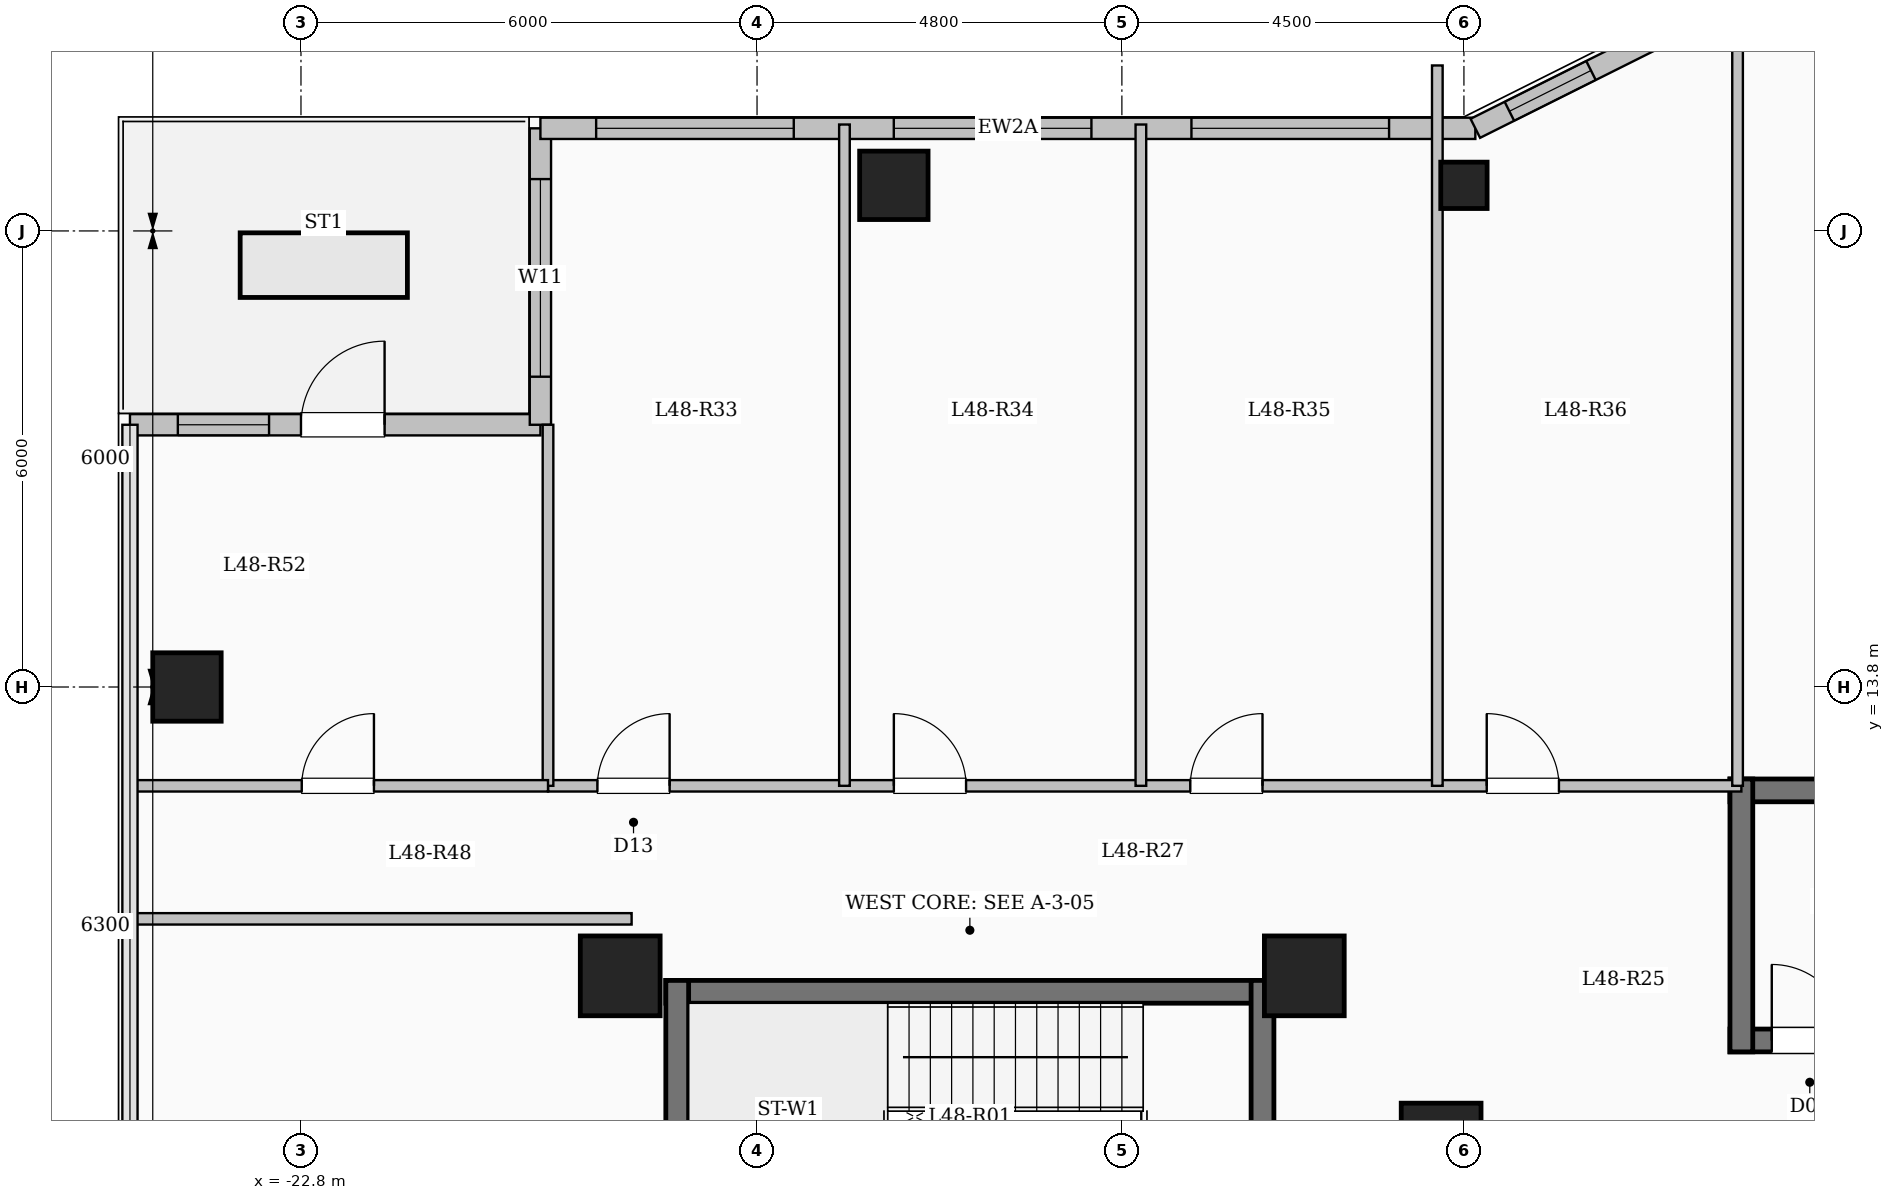
"""IFC4 building model, lengths in metres.
Left out: names, types, materials, properties, quantities, classifications, styles, units other than length and angle.
Written with IfcOpenShell. Run it as: python <this file> out.ifc"""

import sys

from ifc_helpers import new_model, si_unit, direction, frame, frame_2d, origin, origin_2d, place, context, subcontext, project, spatial, rectangle, hollow_circle, extrude, element, fill, save


model = new_model("IFC4")
c1 = context("Model", 3, precision=1e-05, world=origin(), true_north=direction((0.0, 1.0)))
c2 = subcontext(c1, "Body", "Model", "MODEL_VIEW")
j1 = project(units=[si_unit("LENGTHUNIT", "METRE"), si_unit("PLANEANGLEUNIT", "RADIAN")], contexts=[c1])
p1 = place(None, origin())
s1 = spatial("IfcSite", under=j1, at=p1, CompositionType="ELEMENT")
p2 = place(p1, origin())
s2 = spatial("IfcBuilding", under=s1, at=p2, CompositionType="ELEMENT")
p3 = place(p2, frame((0.0, 0.0, 177.3)))
s3 = spatial("IfcBuildingStorey", under=s2, at=p3, CompositionType="ELEMENT", Elevation=177.3)
for number, where, z_axis, x_axis in (
    (1, (-7.8, 7.8, 0.0), (0.0, 0.0, 1.0), (1.0, 0.0, 0.0)),
    (2, (-9.6, 10.0, 0.0), (0.0, 0.0, 1.0), (1.0, 0.0, 0.0)),
    (3, (-18.6, 10.0, 0.0), (0.0, 0.0, 1.0), (1.0, 0.0, 0.0)),
):
    element("IfcColumn", number, at=place(p3, frame(where, z_axis=z_axis, x_axis=x_axis)), inside=s3, PredefinedType="COLUMN", context=c2, shape_type="SweptSolid", body=[
        extrude(rectangle(XDim=1.05, YDim=1.05, at=origin_2d()), origin(), (0.0, 0.0, 1.0), 4.5),
    ])
p4 = place(p3, frame((-15.0, 20.4, 0.0), z_axis=(0.0, 0.0, 1.0), x_axis=(1.0, 0.0, 0.0)))
e4 = element("IfcColumn", 4, at=p4, inside=s3, PredefinedType="COLUMN", context=c2, shape_type="SweptSolid", body=[
    extrude(rectangle(XDim=0.9, YDim=0.9, at=origin_2d()), origin(), (0.0, 0.0, 1.0), 4.5),
])
p5 = place(p3, frame((-7.5, 20.4, 0.0), z_axis=(0.0, 0.0, 1.0), x_axis=(1.0, 0.0, 0.0)))
e5 = element("IfcColumn", 5, at=p5, inside=s3, PredefinedType="COLUMN", context=c2, shape_type="SweptSolid", body=[
    extrude(hollow_circle(Radius=0.305, WallThickness=0.025, at=origin_2d()), origin(), (0.0, 0.0, 1.0), 4.5),
])
p6 = place(p3, frame((-24.3, 13.8, 0.0), z_axis=(0.0, 0.0, 1.0), x_axis=(1.0, 0.0, 0.0)))
e6 = element("IfcColumn", 6, at=p6, inside=s3, PredefinedType="COLUMN", context=c2, shape_type="SweptSolid", body=[
    extrude(rectangle(XDim=0.9, YDim=0.9, at=origin_2d()), origin(), (0.0, 0.0, 1.0), 4.5),
])
p7 = place(p3, frame((-25.05, 17.25, 0.0), z_axis=(0.0, 0.0, 1.0), x_axis=(1.0, 0.0, 0.0)))
e7 = element("IfcWall", 7, at=p7, inside=s3, PredefinedType="SOLIDWALL", context=c2, shape_type="SweptSolid", body=[
    extrude(rectangle(XDim=5.4, YDim=0.28, at=frame_2d((2.7, 0.0))), origin(), (0.0, 0.0, 1.0), 4.2),
])
p8 = place(p7, frame((2.25, 0.0, 0.0)))
e8 = element("IfcOpeningElement", 8, at=p8, cuts=e7, PredefinedType="OPENING", context=c2, shape_type="SweptSolid", body=[
    extrude(rectangle(XDim=1.1, YDim=2.2, at=frame_2d((0.55, 1.1))), frame((0.0, 0.15, 0.0), z_axis=(0.0, -1.0, 0.0), x_axis=(1.0, 0.0, 0.0)), (0.0, 0.0, 1.0), 0.3),
])
p9 = place(p7, frame((0.63, 0.0, 0.95)))
e9 = element("IfcOpeningElement", 9, at=p9, cuts=e7, PredefinedType="OPENING", context=c2, shape_type="SweptSolid", body=[
    extrude(rectangle(XDim=1.2, YDim=1.5, at=frame_2d((0.6, 0.75))), frame((0.0, 0.15, 0.0), z_axis=(0.0, -1.0, 0.0), x_axis=(1.0, 0.0, 0.0)), (0.0, 0.0, 1.0), 0.3),
])
p10 = place(p3, frame((-19.65, 17.25, 0.0), z_axis=(0.0, 0.0, 1.0), x_axis=(0.0, 1.0, 0.0)))
e10 = element("IfcWall", 10, at=p10, inside=s3, PredefinedType="SOLIDWALL", context=c2, shape_type="SweptSolid", body=[
    extrude(rectangle(XDim=3.9, YDim=0.28, at=frame_2d((1.95, 0.0))), origin(), (0.0, 0.0, 1.0), 4.2),
])
p11 = place(p10, frame((0.632, 0.0, 0.85)))
e11 = element("IfcOpeningElement", 11, at=p11, cuts=e10, PredefinedType="OPENING", context=c2, shape_type="SweptSolid", body=[
    extrude(rectangle(XDim=2.6, YDim=2.4, at=frame_2d((1.3, 1.2))), frame((0.0, 0.15, 0.0), z_axis=(0.0, -1.0, 0.0), x_axis=(1.0, 0.0, 0.0)), (0.0, 0.0, 1.0), 0.3),
])
p12 = place(p3, frame((-19.65, 21.15, 0.0), z_axis=(0.0, 0.0, 1.0), x_axis=(1.0, 0.0, 0.0)))
e12 = element("IfcWall", 12, at=p12, inside=s3, PredefinedType="SOLIDWALL", context=c2, shape_type="SweptSolid", body=[
    extrude(rectangle(XDim=12.3, YDim=0.28, at=frame_2d((6.15, 0.0))), origin(), (0.0, 0.0, 1.0), 4.2),
])
p13 = place(p12, frame((0.733, 0.0, 0.85)))
e13 = element("IfcOpeningElement", 13, at=p13, cuts=e12, PredefinedType="OPENING", context=c2, shape_type="SweptSolid", body=[
    extrude(rectangle(XDim=2.6, YDim=2.4, at=frame_2d((1.3, 1.2))), frame((0.0, 0.15, 0.0), z_axis=(0.0, -1.0, 0.0), x_axis=(1.0, 0.0, 0.0)), (0.0, 0.0, 1.0), 0.3),
])
p14 = place(p12, frame((4.649, 0.0, 0.85)))
e14 = element("IfcOpeningElement", 14, at=p14, cuts=e12, PredefinedType="OPENING", context=c2, shape_type="SweptSolid", body=[
    extrude(rectangle(XDim=2.6, YDim=2.4, at=frame_2d((1.3, 1.2))), frame((0.0, 0.15, 0.0), z_axis=(0.0, -1.0, 0.0), x_axis=(1.0, 0.0, 0.0)), (0.0, 0.0, 1.0), 0.3),
])
p15 = place(p12, frame((8.565, 0.0, 0.85)))
e15 = element("IfcOpeningElement", 15, at=p15, cuts=e12, PredefinedType="OPENING", context=c2, shape_type="SweptSolid", body=[
    extrude(rectangle(XDim=2.6, YDim=2.4, at=frame_2d((1.3, 1.2))), frame((0.0, 0.15, 0.0), z_axis=(0.0, -1.0, 0.0), x_axis=(1.0, 0.0, 0.0)), (0.0, 0.0, 1.0), 0.3),
])
p16 = place(p3, frame((-7.35, 21.15, 0.0), z_axis=(0.0, 0.0, 1.0), x_axis=(0.894427191, 0.4472135955, 0.0)))
e16 = element("IfcWall", 16, at=p16, inside=s3, PredefinedType="SOLIDWALL", context=c2, shape_type="SweptSolid", body=[
    extrude(rectangle(XDim=3.354, YDim=0.28, at=frame_2d((1.677, 0.0))), origin(), (0.0, 0.0, 1.0), 4.2),
])
p17 = place(p16, frame((0.501, 0.0, 0.95)))
e17 = element("IfcOpeningElement", 17, at=p17, cuts=e16, PredefinedType="OPENING", context=c2, shape_type="SweptSolid", body=[
    extrude(rectangle(XDim=1.2, YDim=1.5, at=frame_2d((0.6, 0.75))), frame((0.0, 0.15, 0.0), z_axis=(0.0, -1.0, 0.0), x_axis=(1.0, 0.0, 0.0)), (0.0, 0.0, 1.0), 0.3),
])
p18 = place(p3, frame((-18.0, 9.79, 0.0), z_axis=(0.0, 0.0, 1.0), x_axis=(1.0, 0.0, 0.0)))
e18 = element("IfcWall", 18, at=p18, inside=s3, PredefinedType="SHEAR", context=c2, shape_type="SweptSolid", body=[
    extrude(rectangle(XDim=8.0, YDim=0.3, at=frame_2d((4.0, 0.0))), origin(), (0.0, 0.0, 1.0), 4.5),
])
for number, where, z_axis, x_axis in (
    (19, (-17.85, 6.35, 0.0), (0.0, 0.0, 1.0), (0.0, 1.0, 0.0)),
    (20, (-10.15, 6.35, 0.0), (0.0, 0.0, 1.0), (0.0, 1.0, 0.0)),
):
    element("IfcWall", number, at=place(p3, frame(where, z_axis=z_axis, x_axis=x_axis)), inside=s3, PredefinedType="SHEAR", context=c2, shape_type="SweptSolid", body=[
        extrude(rectangle(XDim=3.59, YDim=0.3, at=frame_2d((1.795, 0.0))), origin(), (0.0, 0.0, 1.0), 4.5),
    ])
p19 = place(p3, frame((-4.0, 12.44, 0.0), z_axis=(0.0, 0.0, 1.0), x_axis=(1.0, 0.0, 0.0)))
e21 = element("IfcWall", 21, at=p19, inside=s3, PredefinedType="SHEAR", context=c2, shape_type="SweptSolid", body=[
    extrude(rectangle(XDim=8.0, YDim=0.3, at=frame_2d((4.0, 0.0))), origin(), (0.0, 0.0, 1.0), 4.5),
])
p20 = place(p3, frame((-4.0, 9.15, 0.0), z_axis=(0.0, 0.0, 1.0), x_axis=(1.0, 0.0, 0.0)))
e22 = element("IfcWall", 22, at=p20, inside=s3, PredefinedType="SHEAR", context=c2, shape_type="SweptSolid", body=[
    extrude(rectangle(XDim=8.0, YDim=0.3, at=frame_2d((4.0, 0.0))), origin(), (0.0, 0.0, 1.0), 4.5),
])
p21 = place(p20, frame((0.55, 0.0, 0.0)))
e23 = element("IfcOpeningElement", 23, at=p21, cuts=e22, PredefinedType="OPENING", context=c2, shape_type="SweptSolid", body=[
    extrude(rectangle(XDim=1.0, YDim=2.15, at=frame_2d((0.5, 1.075))), frame((0.0, 0.16, 0.0), z_axis=(0.0, -1.0, 0.0), x_axis=(1.0, 0.0, 0.0)), (0.0, 0.0, 1.0), 0.32),
])
p22 = place(p3, frame((-3.85, 9.0, 0.0), z_axis=(0.0, 0.0, 1.0), x_axis=(0.0, 1.0, 0.0)))
e24 = element("IfcWall", 24, at=p22, inside=s3, PredefinedType="SHEAR", context=c2, shape_type="SweptSolid", body=[
    extrude(rectangle(XDim=3.59, YDim=0.3, at=frame_2d((1.795, 0.0))), origin(), (0.0, 0.0, 1.0), 4.5),
])
p23 = place(p3, frame((-19.55, 12.5, 0.0), z_axis=(0.0, 0.0, 1.0), x_axis=(1.0, 0.0, 0.0)))
e25 = element("IfcWall", 25, at=p23, inside=s3, PredefinedType="PARTITIONING", context=c2, shape_type="SweptSolid", body=[
    extrude(rectangle(XDim=15.7, YDim=0.15, at=frame_2d((7.85, 0.0))), origin(), (0.0, 0.0, 1.0), 4.2),
])
p24 = place(p23, frame((0.65, 0.0, 0.0)))
e26 = element("IfcOpeningElement", 26, at=p24, cuts=e25, PredefinedType="OPENING", context=c2, shape_type="SweptSolid", body=[
    extrude(rectangle(XDim=0.95, YDim=2.15, at=frame_2d((0.475, 1.075))), frame((0.0, 0.085, 0.0), z_axis=(0.0, -1.0, 0.0), x_axis=(1.0, 0.0, 0.0)), (0.0, 0.0, 1.0), 0.17),
])
p25 = place(p23, frame((4.55, 0.0, 0.0)))
e27 = element("IfcOpeningElement", 27, at=p25, cuts=e25, PredefinedType="OPENING", context=c2, shape_type="SweptSolid", body=[
    extrude(rectangle(XDim=0.95, YDim=2.15, at=frame_2d((0.475, 1.075))), frame((0.0, 0.085, 0.0), z_axis=(0.0, -1.0, 0.0), x_axis=(1.0, 0.0, 0.0)), (0.0, 0.0, 1.0), 0.17),
])
p26 = place(p23, frame((8.45, 0.0, 0.0)))
e28 = element("IfcOpeningElement", 28, at=p26, cuts=e25, PredefinedType="OPENING", context=c2, shape_type="SweptSolid", body=[
    extrude(rectangle(XDim=0.95, YDim=2.15, at=frame_2d((0.475, 1.075))), frame((0.0, 0.085, 0.0), z_axis=(0.0, -1.0, 0.0), x_axis=(1.0, 0.0, 0.0)), (0.0, 0.0, 1.0), 0.17),
])
p27 = place(p23, frame((12.35, 0.0, 0.0)))
e29 = element("IfcOpeningElement", 29, at=p27, cuts=e25, PredefinedType="OPENING", context=c2, shape_type="SweptSolid", body=[
    extrude(rectangle(XDim=0.95, YDim=2.15, at=frame_2d((0.475, 1.075))), frame((0.0, 0.085, 0.0), z_axis=(0.0, -1.0, 0.0), x_axis=(1.0, 0.0, 0.0)), (0.0, 0.0, 1.0), 0.17),
])
p28 = place(p3, frame((-3.9, 12.5, 0.0), z_axis=(0.0, 0.0, 1.0), x_axis=(0.0, 1.0, 0.0)))
e30 = element("IfcWall", 30, at=p28, inside=s3, PredefinedType="PARTITIONING", context=c2, shape_type="SweptSolid", body=[
    extrude(rectangle(XDim=10.18, YDim=0.14, at=frame_2d((5.09, 0.0))), origin(), (0.0, 0.0, 1.0), 4.2),
])
for number, where, z_axis, x_axis in (
    (31, (-15.65, 12.5, 0.0), (0.0, 0.0, 1.0), (0.0, 1.0, 0.0)),
    (32, (-11.75, 12.5, 0.0), (0.0, 0.0, 1.0), (0.0, 1.0, 0.0)),
):
    element("IfcWall", number, at=place(p3, frame(where, z_axis=z_axis, x_axis=x_axis)), inside=s3, PredefinedType="PARTITIONING", context=c2, shape_type="SweptSolid", body=[
        extrude(rectangle(XDim=8.7, YDim=0.14, at=frame_2d((4.35, 0.0))), origin(), (0.0, 0.0, 1.0), 4.2),
    ])
p29 = place(p3, frame((-7.85, 12.5, 0.0), z_axis=(0.0, 0.0, 1.0), x_axis=(0.0, 1.0, 0.0)))
e33 = element("IfcWall", 33, at=p29, inside=s3, PredefinedType="PARTITIONING", context=c2, shape_type="SweptSolid", body=[
    extrude(rectangle(XDim=9.477, YDim=0.14, at=frame_2d((4.739, 0.0))), origin(), (0.0, 0.0, 1.0), 3.685),
])
p30 = place(p3, frame((-25.08, 10.75, 0.0), z_axis=(0.0, 0.0, 1.0), x_axis=(1.0, 0.0, 0.0)))
e34 = element("IfcWall", 34, at=p30, inside=s3, PredefinedType="PARTITIONING", context=c2, shape_type="SweptSolid", body=[
    extrude(rectangle(XDim=6.63, YDim=0.15, at=frame_2d((3.315, 0.0))), origin(), (0.0, 0.0, 1.0), 4.2),
])
p31 = place(p3, frame((-19.55, 12.5, 0.0), z_axis=(0.0, 0.0, 1.0), x_axis=(0.0, 1.0, 0.0)))
e35 = element("IfcWall", 35, at=p31, inside=s3, PredefinedType="PARTITIONING", context=c2, shape_type="SweptSolid", body=[
    extrude(rectangle(XDim=4.75, YDim=0.14, at=frame_2d((2.375, 0.0))), origin(), (0.0, 0.0, 1.0), 4.2),
])
p32 = place(p3, frame((-25.08, 12.5, 0.0), z_axis=(0.0, 0.0, 1.0), x_axis=(1.0, 0.0, 0.0)))
e36 = element("IfcWall", 36, at=p32, inside=s3, PredefinedType="PARTITIONING", context=c2, shape_type="SweptSolid", body=[
    extrude(rectangle(XDim=5.53, YDim=0.15, at=frame_2d((2.765, 0.0))), origin(), (0.0, 0.0, 1.0), 4.2),
])
p33 = place(p32, frame((2.29, 0.0, 0.0)))
e37 = element("IfcOpeningElement", 37, at=p33, cuts=e36, PredefinedType="OPENING", context=c2, shape_type="SweptSolid", body=[
    extrude(rectangle(XDim=0.95, YDim=2.15, at=frame_2d((0.475, 1.075))), frame((0.0, 0.085, 0.0), z_axis=(0.0, -1.0, 0.0), x_axis=(1.0, 0.0, 0.0)), (0.0, 0.0, 1.0), 0.17),
])
p34 = place(p8, origin())
e38 = element("IfcDoor", 38, at=p34, inside=s3, OperationType="SINGLE_SWING_RIGHT", PredefinedType="DOOR", context=c2, shape_type="SweptSolid", body=[
    extrude(rectangle(XDim=1.1, YDim=2.2, at=frame_2d((0.55, 1.1))), frame((0.0, 0.025, 0.0), z_axis=(0.0, -1.0, 0.0), x_axis=(1.0, 0.0, 0.0)), (0.0, 0.0, 1.0), 0.05),
])
fill(e8, e38)
p35 = place(p9, origin())
e39 = element("IfcWindow", 39, at=p35, inside=s3, PartitioningType="SINGLE_PANEL", PredefinedType="WINDOW", context=c2, shape_type="SweptSolid", body=[
    extrude(rectangle(XDim=1.2, YDim=1.5, at=frame_2d((0.6, 0.75))), frame((0.0, 0.03, 0.0), z_axis=(0.0, -1.0, 0.0), x_axis=(1.0, 0.0, 0.0)), (0.0, 0.0, 1.0), 0.06),
])
fill(e9, e39)
p36 = place(p11, origin())
e40 = element("IfcWindow", 40, at=p36, inside=s3, PartitioningType="SINGLE_PANEL", PredefinedType="WINDOW", context=c2, shape_type="SweptSolid", body=[
    extrude(rectangle(XDim=2.6, YDim=2.4, at=frame_2d((1.3, 1.2))), frame((0.0, 0.03, 0.0), z_axis=(0.0, -1.0, 0.0), x_axis=(1.0, 0.0, 0.0)), (0.0, 0.0, 1.0), 0.06),
])
fill(e11, e40)
p37 = place(p13, origin())
e41 = element("IfcWindow", 41, at=p37, inside=s3, PartitioningType="SINGLE_PANEL", PredefinedType="WINDOW", context=c2, shape_type="SweptSolid", body=[
    extrude(rectangle(XDim=2.6, YDim=2.4, at=frame_2d((1.3, 1.2))), frame((0.0, 0.03, 0.0), z_axis=(0.0, -1.0, 0.0), x_axis=(1.0, 0.0, 0.0)), (0.0, 0.0, 1.0), 0.06),
])
fill(e13, e41)
p38 = place(p14, origin())
e42 = element("IfcWindow", 42, at=p38, inside=s3, PartitioningType="SINGLE_PANEL", PredefinedType="WINDOW", context=c2, shape_type="SweptSolid", body=[
    extrude(rectangle(XDim=2.6, YDim=2.4, at=frame_2d((1.3, 1.2))), frame((0.0, 0.03, 0.0), z_axis=(0.0, -1.0, 0.0), x_axis=(1.0, 0.0, 0.0)), (0.0, 0.0, 1.0), 0.06),
])
fill(e14, e42)
p39 = place(p15, origin())
e43 = element("IfcWindow", 43, at=p39, inside=s3, PartitioningType="SINGLE_PANEL", PredefinedType="WINDOW", context=c2, shape_type="SweptSolid", body=[
    extrude(rectangle(XDim=2.6, YDim=2.4, at=frame_2d((1.3, 1.2))), frame((0.0, 0.03, 0.0), z_axis=(0.0, -1.0, 0.0), x_axis=(1.0, 0.0, 0.0)), (0.0, 0.0, 1.0), 0.06),
])
fill(e15, e43)
p40 = place(p17, origin())
e44 = element("IfcWindow", 44, at=p40, inside=s3, PartitioningType="SINGLE_PANEL", PredefinedType="WINDOW", context=c2, shape_type="SweptSolid", body=[
    extrude(rectangle(XDim=1.2, YDim=1.5, at=frame_2d((0.6, 0.75))), frame((0.0, 0.03, 0.0), z_axis=(0.0, -1.0, 0.0), x_axis=(1.0, 0.0, 0.0)), (0.0, 0.0, 1.0), 0.06),
])
fill(e17, e44)
p41 = place(p21, origin())
e45 = element("IfcDoor", 45, at=p41, inside=s3, OperationType="SINGLE_SWING_LEFT", PredefinedType="DOOR", context=c2, shape_type="SweptSolid", body=[
    extrude(rectangle(XDim=1.0, YDim=2.15, at=frame_2d((0.5, 1.075))), frame((0.0, 0.025, 0.0), z_axis=(0.0, -1.0, 0.0), x_axis=(1.0, 0.0, 0.0)), (0.0, 0.0, 1.0), 0.05),
])
fill(e23, e45)
p42 = place(p24, origin())
e46 = element("IfcDoor", 46, at=p42, inside=s3, OperationType="SINGLE_SWING_RIGHT", PredefinedType="DOOR", context=c2, shape_type="SweptSolid", body=[
    extrude(rectangle(XDim=0.95, YDim=2.15, at=frame_2d((0.475, 1.075))), frame((0.0, 0.025, 0.0), z_axis=(0.0, -1.0, 0.0), x_axis=(1.0, 0.0, 0.0)), (0.0, 0.0, 1.0), 0.05),
])
fill(e26, e46)
p43 = place(p25, origin())
e47 = element("IfcDoor", 47, at=p43, inside=s3, OperationType="SINGLE_SWING_LEFT", PredefinedType="DOOR", context=c2, shape_type="SweptSolid", body=[
    extrude(rectangle(XDim=0.95, YDim=2.15, at=frame_2d((0.475, 1.075))), frame((0.0, 0.025, 0.0), z_axis=(0.0, -1.0, 0.0), x_axis=(1.0, 0.0, 0.0)), (0.0, 0.0, 1.0), 0.05),
])
fill(e27, e47)
p44 = place(p26, origin())
e48 = element("IfcDoor", 48, at=p44, inside=s3, OperationType="SINGLE_SWING_RIGHT", PredefinedType="DOOR", context=c2, shape_type="SweptSolid", body=[
    extrude(rectangle(XDim=0.95, YDim=2.15, at=frame_2d((0.475, 1.075))), frame((0.0, 0.025, 0.0), z_axis=(0.0, -1.0, 0.0), x_axis=(1.0, 0.0, 0.0)), (0.0, 0.0, 1.0), 0.05),
])
fill(e28, e48)
p45 = place(p27, origin())
e49 = element("IfcDoor", 49, at=p45, inside=s3, OperationType="SINGLE_SWING_LEFT", PredefinedType="DOOR", context=c2, shape_type="SweptSolid", body=[
    extrude(rectangle(XDim=0.95, YDim=2.15, at=frame_2d((0.475, 1.075))), frame((0.0, 0.025, 0.0), z_axis=(0.0, -1.0, 0.0), x_axis=(1.0, 0.0, 0.0)), (0.0, 0.0, 1.0), 0.05),
])
fill(e29, e49)
p46 = place(p33, origin())
e50 = element("IfcDoor", 50, at=p46, inside=s3, OperationType="SINGLE_SWING_RIGHT", PredefinedType="DOOR", context=c2, shape_type="SweptSolid", body=[
    extrude(rectangle(XDim=0.95, YDim=2.15, at=frame_2d((0.475, 1.075))), frame((0.0, 0.025, 0.0), z_axis=(0.0, -1.0, 0.0), x_axis=(1.0, 0.0, 0.0)), (0.0, 0.0, 1.0), 0.05),
])
fill(e37, e50)
save(model, sys.argv[1])
